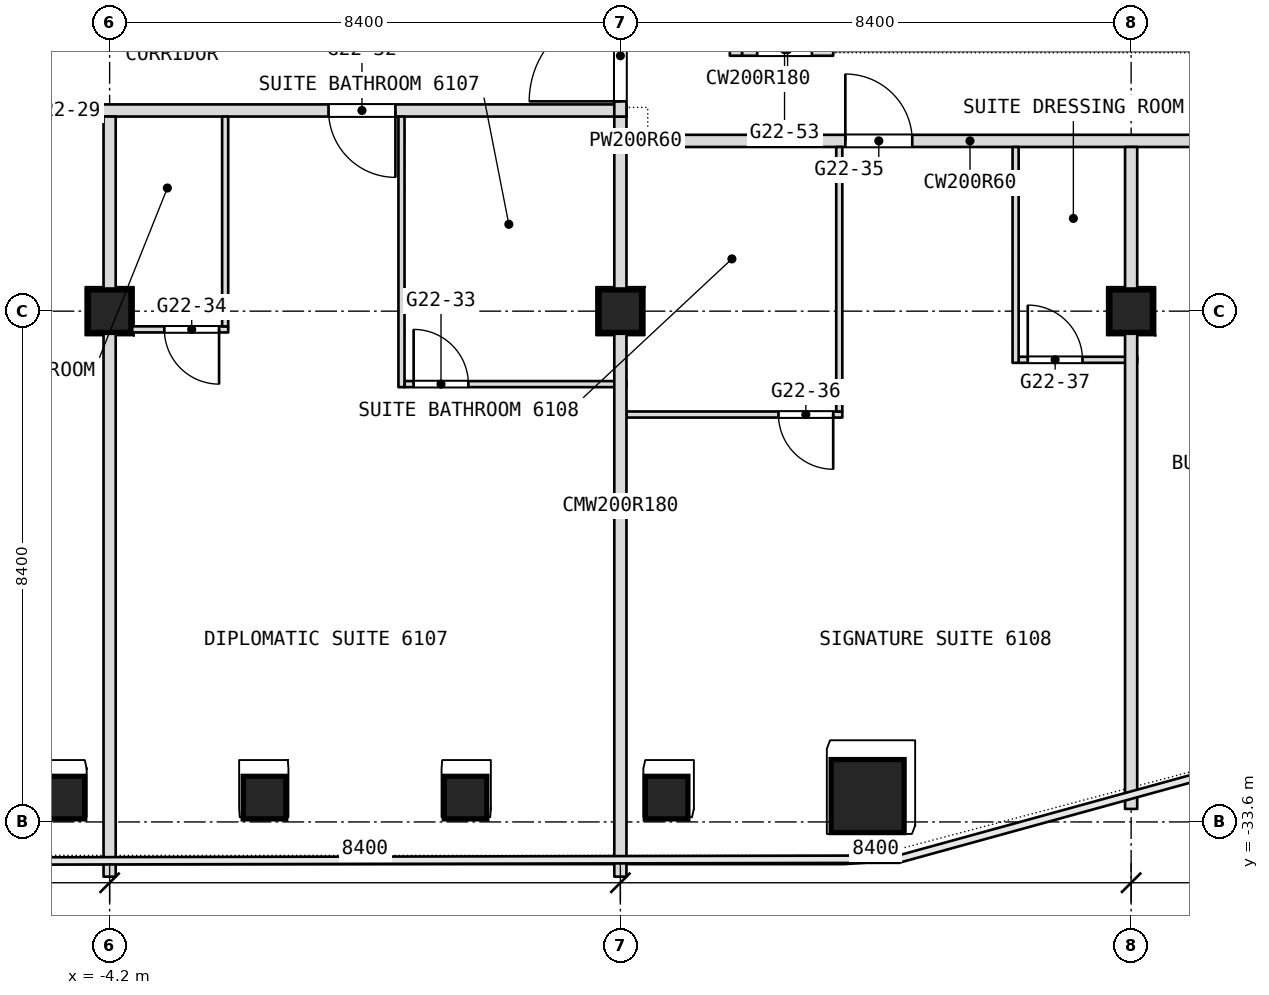
"""IFC4 building model, lengths in metres.
Left out: names, types, materials, properties, quantities, classifications, styles, units other than length and angle.
Written with IfcOpenShell. Run it as: python <this file> out.ifc"""

import sys

from ifc_helpers import new_model, si_unit, direction, frame, frame_2d, origin, origin_2d, place, context, subcontext, project, spatial, rectangle, extrude, element, fill, save


model = new_model("IFC4")
c1 = context("Model", 3, precision=1e-05, world=origin(), true_north=direction((0.0, 1.0)))
c2 = subcontext(c1, "Body", "Model", "MODEL_VIEW")
j1 = project(units=[si_unit("LENGTHUNIT", "METRE"), si_unit("PLANEANGLEUNIT", "RADIAN")], contexts=[c1])
p1 = place(None, origin())
s1 = spatial("IfcSite", under=j1, at=p1, CompositionType="ELEMENT")
p2 = place(p1, origin())
s2 = spatial("IfcBuilding", under=s1, at=p2, CompositionType="ELEMENT")
p3 = place(p2, frame((0.0, 0.0, 266.9)))
s3 = spatial("IfcBuildingStorey", under=s2, at=p3, CompositionType="ELEMENT", Elevation=266.9)
p4 = place(p3, frame((8.266, -33.175, 0.0), z_axis=(0.0, 0.0, 1.0), x_axis=(1.0, 0.0, 0.0)))
e1 = element("IfcColumn", 1, at=p4, inside=s3, PredefinedType="COLUMN", context=c2, shape_type="SweptSolid", body=[
    extrude(rectangle(XDim=1.2, YDim=1.2, at=origin_2d()), origin(), (0.0, 0.0, 1.0), 3.6),
])
for number, where, z_axis, x_axis in (
    (2, (-4.2, -25.2, 0.0), (0.0, 0.0, 1.0), (1.0, 0.0, 0.0)),
    (3, (4.2, -25.2, 0.0), (0.0, 0.0, 1.0), (1.0, 0.0, 0.0)),
    (4, (12.6, -25.2, 0.0), (0.0, 0.0, 1.0), (1.0, 0.0, 0.0)),
    (5, (4.96, -33.2, 0.0), (0.0, 0.0, 1.0), (1.0, 0.0, 0.0)),
    (6, (1.653, -33.2, 0.0), (0.0, 0.0, 1.0), (1.0, 0.0, 0.0)),
    (7, (-1.653, -33.2, 0.0), (0.0, 0.0, 1.0), (1.0, 0.0, 0.0)),
    (8, (-4.96, -33.2, 0.0), (0.0, 0.0, 1.0), (1.0, 0.0, 0.0)),
):
    element("IfcColumn", number, at=place(p3, frame(where, z_axis=z_axis, x_axis=x_axis)), inside=s3, PredefinedType="COLUMN", context=c2, shape_type="SweptSolid", body=[
        extrude(rectangle(XDim=0.7, YDim=0.7, at=origin_2d()), origin(), (0.0, 0.0, 1.0), 3.6),
    ])
p5 = place(p3, frame((4.3, -26.9, 0.0), z_axis=(0.0, 0.0, 1.0), x_axis=(1.0, 0.0, 0.0)))
e9 = element("IfcWall", 9, at=p5, inside=s3, PredefinedType="PARTITIONING", context=c2, shape_type="SweptSolid", body=[
    extrude(rectangle(XDim=3.55, YDim=0.1, at=frame_2d((1.775, 0.0))), origin(), (0.0, 0.0, 1.0), 3.34),
])
p6 = place(p5, frame((2.5, 0.0, 0.0)))
e10 = element("IfcOpeningElement", 10, at=p6, cuts=e9, PredefinedType="OPENING", context=c2, shape_type="SweptSolid", body=[
    extrude(rectangle(XDim=0.9, YDim=2.1, at=frame_2d((0.45, 1.05))), frame((0.0, 0.05, 0.0), z_axis=(0.0, -1.0, 0.0), x_axis=(1.0, 0.0, 0.0)), (0.0, 0.0, 1.0), 0.1),
])
p7 = place(p3, frame((0.65, -26.4, 0.0), z_axis=(0.0, 0.0, 1.0), x_axis=(1.0, 0.0, 0.0)))
e11 = element("IfcWall", 11, at=p7, inside=s3, PredefinedType="PARTITIONING", context=c2, shape_type="SweptSolid", body=[
    extrude(rectangle(XDim=3.65, YDim=0.1, at=frame_2d((1.825, 0.0))), origin(), (0.0, 0.0, 1.0), 3.34),
])
p8 = place(p7, frame((0.15, 0.0, 0.0)))
e12 = element("IfcOpeningElement", 12, at=p8, cuts=e11, PredefinedType="OPENING", context=c2, shape_type="SweptSolid", body=[
    extrude(rectangle(XDim=0.9, YDim=2.1, at=frame_2d((0.45, 1.05))), frame((0.0, 0.05, 0.0), z_axis=(0.0, -1.0, 0.0), x_axis=(1.0, 0.0, 0.0)), (0.0, 0.0, 1.0), 0.1),
])
p9 = place(p3, frame((10.75, -26.0, 0.0), z_axis=(0.0, 0.0, 1.0), x_axis=(1.0, 0.0, 0.0)))
e13 = element("IfcWall", 13, at=p9, inside=s3, PredefinedType="PARTITIONING", context=c2, shape_type="SweptSolid", body=[
    extrude(rectangle(XDim=1.95, YDim=0.1, at=frame_2d((0.975, 0.0))), origin(), (0.0, 0.0, 1.0), 3.34),
])
p10 = place(p9, frame((0.15, 0.0, 0.0)))
e14 = element("IfcOpeningElement", 14, at=p10, cuts=e13, PredefinedType="OPENING", context=c2, shape_type="SweptSolid", body=[
    extrude(rectangle(XDim=0.9, YDim=2.1, at=frame_2d((0.45, 1.05))), frame((0.0, 0.05, 0.0), z_axis=(0.0, -1.0, 0.0), x_axis=(1.0, 0.0, 0.0)), (0.0, 0.0, 1.0), 0.1),
])
p11 = place(p3, frame((-4.1, -25.5, 0.0), z_axis=(0.0, 0.0, 1.0), x_axis=(1.0, 0.0, 0.0)))
e15 = element("IfcWall", 15, at=p11, inside=s3, PredefinedType="PARTITIONING", context=c2, shape_type="SweptSolid", body=[
    extrude(rectangle(XDim=1.85, YDim=0.1, at=frame_2d((0.925, 0.0))), origin(), (0.0, 0.0, 1.0), 3.34),
])
p12 = place(p11, frame((0.8, 0.0, 0.0)))
e16 = element("IfcOpeningElement", 16, at=p12, cuts=e15, PredefinedType="OPENING", context=c2, shape_type="SweptSolid", body=[
    extrude(rectangle(XDim=0.9, YDim=2.1, at=frame_2d((0.45, 1.05))), frame((0.0, 0.05, 0.0), z_axis=(0.0, -1.0, 0.0), x_axis=(1.0, 0.0, 0.0)), (0.0, 0.0, 1.0), 0.1),
])
p13 = place(p3, frame((4.3, -22.4, 0.0), z_axis=(0.0, 0.0, 1.0), x_axis=(1.0, 0.0, 0.0)))
e17 = element("IfcWall", 17, at=p13, inside=s3, PredefinedType="PARTITIONING", context=c2, shape_type="SweptSolid", body=[
    extrude(rectangle(XDim=0.3, YDim=0.2, at=frame_2d((0.15, 0.0))), origin(), (0.0, 0.0, 1.0), 3.34),
])
p14 = place(p3, frame((4.6, -22.4, 0.0), z_axis=(0.0, 0.0, 1.0), x_axis=(1.0, 0.0, 0.0)))
e18 = element("IfcWall", 18, at=p14, inside=s3, PredefinedType="PARTITIONING", context=c2, shape_type="SweptSolid", body=[
    extrude(rectangle(XDim=10.7, YDim=0.2, at=frame_2d((5.35, 0.0))), origin(), (0.0, 0.0, 1.0), 3.34),
])
p15 = place(p14, frame((3.3, 0.0, 0.0)))
e19 = element("IfcOpeningElement", 19, at=p15, cuts=e18, PredefinedType="OPENING", context=c2, shape_type="SweptSolid", body=[
    extrude(rectangle(XDim=1.1, YDim=2.1, at=frame_2d((0.55, 1.05))), frame((0.0, 0.1, 0.0), z_axis=(0.0, -1.0, 0.0), x_axis=(1.0, 0.0, 0.0)), (0.0, 0.0, 1.0), 0.2),
])
p16 = place(p14, frame((9.55, 0.0, 0.0)))
e20 = element("IfcOpeningElement", 20, at=p16, cuts=e18, PredefinedType="OPENING", context=c2, shape_type="SweptSolid", body=[
    extrude(rectangle(XDim=1.0, YDim=2.1, at=frame_2d((0.5, 1.05))), frame((0.0, 0.1, 0.0), z_axis=(0.0, -1.0, 0.0), x_axis=(1.0, 0.0, 0.0)), (0.0, 0.0, 1.0), 0.2),
])
p17 = place(p3, frame((-16.7, -21.9, 0.0), z_axis=(0.0, 0.0, 1.0), x_axis=(1.0, 0.0, 0.0)))
e21 = element("IfcWall", 21, at=p17, inside=s3, PredefinedType="PARTITIONING", context=c2, shape_type="SweptSolid", body=[
    extrude(rectangle(XDim=21.0, YDim=0.2, at=frame_2d((10.5, 0.0))), origin(), (0.0, 0.0, 1.0), 3.34),
])
p18 = place(p17, frame((1.5, 0.0, 0.0)))
e22 = element("IfcOpeningElement", 22, at=p18, cuts=e21, PredefinedType="OPENING", context=c2, shape_type="SweptSolid", body=[
    extrude(rectangle(XDim=1.0, YDim=2.1, at=frame_2d((0.5, 1.05))), frame((0.0, 0.1, 0.0), z_axis=(0.0, -1.0, 0.0), x_axis=(1.0, 0.0, 0.0)), (0.0, 0.0, 1.0), 0.2),
])
p19 = place(p17, frame((9.85, 0.0, 0.0)))
e23 = element("IfcOpeningElement", 23, at=p19, cuts=e21, PredefinedType="OPENING", context=c2, shape_type="SweptSolid", body=[
    extrude(rectangle(XDim=1.1, YDim=2.1, at=frame_2d((0.55, 1.05))), frame((0.0, 0.1, 0.0), z_axis=(0.0, -1.0, 0.0), x_axis=(1.0, 0.0, 0.0)), (0.0, 0.0, 1.0), 0.2),
])
p20 = place(p17, frame((16.1, 0.0, 0.0)))
e24 = element("IfcOpeningElement", 24, at=p20, cuts=e21, PredefinedType="OPENING", context=c2, shape_type="SweptSolid", body=[
    extrude(rectangle(XDim=1.1, YDim=2.1, at=frame_2d((0.55, 1.05))), frame((0.0, 0.1, 0.0), z_axis=(0.0, -1.0, 0.0), x_axis=(1.0, 0.0, 0.0)), (0.0, 0.0, 1.0), 0.2),
])
p21 = place(p3, frame((6.2, -20.9, 0.0), z_axis=(0.0, 0.0, 1.0), x_axis=(1.0, 0.0, 0.0)))
e25 = element("IfcWall", 25, at=p21, inside=s3, PredefinedType="PARTITIONING", context=c2, shape_type="SweptSolid", body=[
    extrude(rectangle(XDim=1.5, YDim=0.2, at=frame_2d((0.75, 0.0))), origin(), (0.0, 0.0, 1.0), 3.34),
])
p22 = place(p21, frame((0.25, 0.0, 0.0)))
e26 = element("IfcOpeningElement", 26, at=p22, cuts=e25, PredefinedType="OPENING", context=c2, shape_type="SweptSolid", body=[
    extrude(rectangle(XDim=0.9, YDim=2.1, at=frame_2d((0.45, 1.05))), frame((0.0, 0.1, 0.0), z_axis=(0.0, -1.0, 0.0), x_axis=(1.0, 0.0, 0.0)), (0.0, 0.0, 1.0), 0.2),
])
p23 = place(p3, frame((12.6, -33.386, 0.0), z_axis=(0.0, 0.0, 1.0), x_axis=(0.0, 1.0, 0.0)))
e27 = element("IfcWall", 27, at=p23, inside=s3, PredefinedType="PARTITIONING", context=c2, shape_type="SweptSolid", body=[
    extrude(rectangle(XDim=10.886, YDim=0.2, at=frame_2d((5.443, 0.0))), origin(), (0.0, 0.0, 1.0), 3.34),
])
p24 = place(p3, frame((10.7, -26.05, 0.0), z_axis=(0.0, 0.0, 1.0), x_axis=(0.0, 1.0, 0.0)))
e28 = element("IfcWall", 28, at=p24, inside=s3, PredefinedType="PARTITIONING", context=c2, shape_type="SweptSolid", body=[
    extrude(rectangle(XDim=3.55, YDim=0.1, at=frame_2d((1.775, 0.0))), origin(), (0.0, 0.0, 1.0), 3.34),
])
p25 = place(p3, frame((7.8, -26.85, 0.0), z_axis=(0.0, 0.0, 1.0), x_axis=(0.0, 1.0, 0.0)))
e29 = element("IfcWall", 29, at=p25, inside=s3, PredefinedType="PARTITIONING", context=c2, shape_type="SweptSolid", body=[
    extrude(rectangle(XDim=4.35, YDim=0.1, at=frame_2d((2.175, 0.0))), origin(), (0.0, 0.0, 1.0), 3.34),
])
p26 = place(p3, frame((6.1, -21.0, 0.0), z_axis=(0.0, 0.0, 1.0), x_axis=(0.0, 1.0, 0.0)))
e30 = element("IfcWall", 30, at=p26, inside=s3, PredefinedType="PARTITIONING", context=c2, shape_type="SweptSolid", body=[
    extrude(rectangle(XDim=1.9, YDim=0.2, at=frame_2d((0.95, 0.0))), origin(), (0.0, 0.0, 1.0), 3.34),
])
p27 = place(p3, frame((4.2, -34.5, 0.0), z_axis=(0.0, 0.0, 1.0), x_axis=(0.0, 1.0, 0.0)))
e31 = element("IfcWall", 31, at=p27, inside=s3, PredefinedType="PARTITIONING", context=c2, shape_type="SweptSolid", body=[
    extrude(rectangle(XDim=12.2, YDim=0.2, at=frame_2d((6.1, 0.0))), origin(), (0.0, 0.0, 1.0), 3.34),
])
p28 = place(p3, frame((4.2, -22.5, 0.0), z_axis=(0.0, 0.0, 1.0), x_axis=(0.0, 1.0, 0.0)))
e32 = element("IfcWall", 32, at=p28, inside=s3, PredefinedType="PARTITIONING", context=c2, shape_type="SweptSolid", body=[
    extrude(rectangle(XDim=0.5, YDim=0.2, at=frame_2d((0.25, 0.0))), origin(), (0.0, 0.0, 1.0), 3.34),
])
p29 = place(p3, frame((4.2, -22.0, 0.0), z_axis=(0.0, 0.0, 1.0), x_axis=(0.0, 1.0, 0.0)))
e33 = element("IfcWall", 33, at=p29, inside=s3, PredefinedType="PARTITIONING", context=c2, shape_type="SweptSolid", body=[
    extrude(rectangle(XDim=8.4, YDim=0.2, at=frame_2d((4.2, 0.0))), origin(), (0.0, 0.0, 1.0), 3.34),
])
p30 = place(p29, frame((0.25, 0.0, 0.0)))
e34 = element("IfcOpeningElement", 34, at=p30, cuts=e33, PredefinedType="OPENING", context=c2, shape_type="SweptSolid", body=[
    extrude(rectangle(XDim=1.5, YDim=2.1, at=frame_2d((0.75, 1.05))), frame((0.0, 0.1, 0.0), z_axis=(0.0, -1.0, 0.0), x_axis=(1.0, 0.0, 0.0)), (0.0, 0.0, 1.0), 0.2),
])
p31 = place(p3, frame((0.6, -26.45, 0.0), z_axis=(0.0, 0.0, 1.0), x_axis=(0.0, 1.0, 0.0)))
e35 = element("IfcWall", 35, at=p31, inside=s3, PredefinedType="PARTITIONING", context=c2, shape_type="SweptSolid", body=[
    extrude(rectangle(XDim=4.45, YDim=0.1, at=frame_2d((2.225, 0.0))), origin(), (0.0, 0.0, 1.0), 3.34),
])
p32 = place(p3, frame((-2.3, -25.45, 0.0), z_axis=(0.0, 0.0, 1.0), x_axis=(0.0, 1.0, 0.0)))
e36 = element("IfcWall", 36, at=p32, inside=s3, PredefinedType="PARTITIONING", context=c2, shape_type="SweptSolid", body=[
    extrude(rectangle(XDim=3.45, YDim=0.1, at=frame_2d((1.725, 0.0))), origin(), (0.0, 0.0, 1.0), 3.34),
])
p33 = place(p3, frame((-4.2, -34.5, 0.0), z_axis=(0.0, 0.0, 1.0), x_axis=(0.0, 1.0, 0.0)))
e37 = element("IfcWall", 37, at=p33, inside=s3, PredefinedType="PARTITIONING", context=c2, shape_type="SweptSolid", body=[
    extrude(rectangle(XDim=12.5, YDim=0.2, at=frame_2d((6.25, 0.0))), origin(), (0.0, 0.0, 1.0), 3.34),
])
p34 = place(p6, origin())
e38 = element("IfcDoor", 38, at=p34, inside=s3, OperationType="SINGLE_SWING_RIGHT", PredefinedType="DOOR", context=c2, shape_type="SweptSolid", body=[
    extrude(rectangle(XDim=0.9, YDim=2.1, at=frame_2d((0.45, 1.05))), frame((0.0, 0.025, 0.0), z_axis=(0.0, -1.0, 0.0), x_axis=(1.0, 0.0, 0.0)), (0.0, 0.0, 1.0), 0.05),
])
fill(e10, e38)
p35 = place(p8, origin())
e39 = element("IfcDoor", 39, at=p35, inside=s3, OperationType="SINGLE_SWING_LEFT", PredefinedType="DOOR", context=c2, shape_type="SweptSolid", body=[
    extrude(rectangle(XDim=0.9, YDim=2.1, at=frame_2d((0.45, 1.05))), frame((0.0, 0.025, 0.0), z_axis=(0.0, -1.0, 0.0), x_axis=(1.0, 0.0, 0.0)), (0.0, 0.0, 1.0), 0.05),
])
fill(e12, e39)
p36 = place(p10, origin())
e40 = element("IfcDoor", 40, at=p36, inside=s3, OperationType="SINGLE_SWING_LEFT", PredefinedType="DOOR", context=c2, shape_type="SweptSolid", body=[
    extrude(rectangle(XDim=0.9, YDim=2.1, at=frame_2d((0.45, 1.05))), frame((0.0, 0.025, 0.0), z_axis=(0.0, -1.0, 0.0), x_axis=(1.0, 0.0, 0.0)), (0.0, 0.0, 1.0), 0.05),
])
fill(e14, e40)
p37 = place(p12, origin())
e41 = element("IfcDoor", 41, at=p37, inside=s3, OperationType="SINGLE_SWING_RIGHT", PredefinedType="DOOR", context=c2, shape_type="SweptSolid", body=[
    extrude(rectangle(XDim=0.9, YDim=2.1, at=frame_2d((0.45, 1.05))), frame((0.0, 0.025, 0.0), z_axis=(0.0, -1.0, 0.0), x_axis=(1.0, 0.0, 0.0)), (0.0, 0.0, 1.0), 0.05),
])
fill(e16, e41)
p38 = place(p15, origin())
e42 = element("IfcDoor", 42, at=p38, inside=s3, OperationType="SINGLE_SWING_RIGHT", PredefinedType="DOOR", context=c2, shape_type="SweptSolid", body=[
    extrude(rectangle(XDim=1.1, YDim=2.1, at=frame_2d((0.55, 1.05))), frame((0.0, 0.025, 0.0), z_axis=(0.0, -1.0, 0.0), x_axis=(1.0, 0.0, 0.0)), (0.0, 0.0, 1.0), 0.05),
])
fill(e19, e42)
p39 = place(p20, origin())
e43 = element("IfcDoor", 43, at=p39, inside=s3, OperationType="SINGLE_SWING_LEFT", PredefinedType="DOOR", context=c2, shape_type="SweptSolid", body=[
    extrude(rectangle(XDim=1.1, YDim=2.1, at=frame_2d((0.55, 1.05))), frame((0.0, 0.025, 0.0), z_axis=(0.0, -1.0, 0.0), x_axis=(1.0, 0.0, 0.0)), (0.0, 0.0, 1.0), 0.05),
])
fill(e24, e43)
p40 = place(p30, origin())
e44 = element("IfcDoor", 44, at=p40, inside=s3, OperationType="DOUBLE_DOOR_DOUBLE_SWING", PredefinedType="DOOR", context=c2, shape_type="SweptSolid", body=[
    extrude(rectangle(XDim=1.5, YDim=2.1, at=frame_2d((0.75, 1.05))), frame((0.0, 0.025, 0.0), z_axis=(0.0, -1.0, 0.0), x_axis=(1.0, 0.0, 0.0)), (0.0, 0.0, 1.0), 0.05),
])
fill(e34, e44)
save(model, sys.argv[1])
